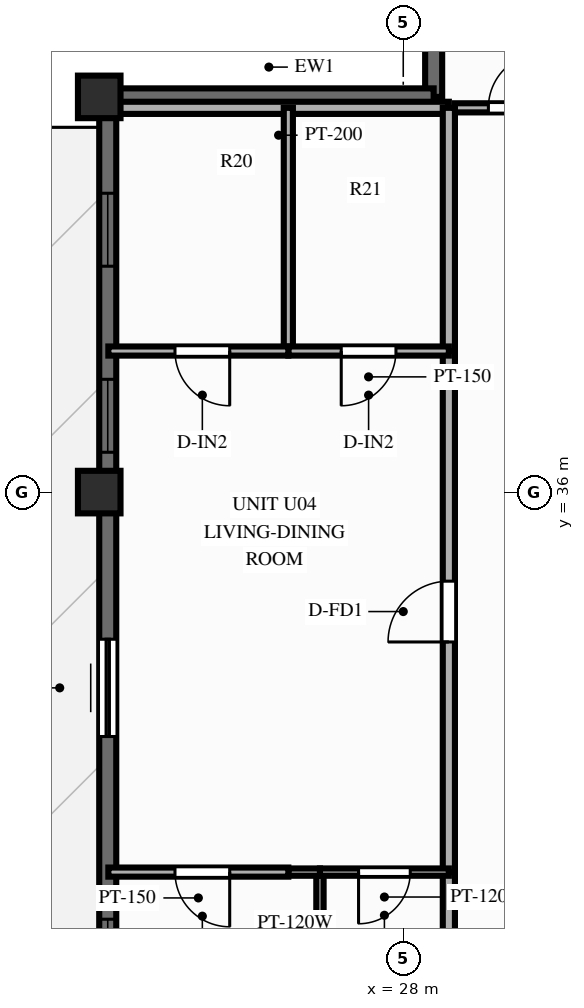
"""IFC4 building model, lengths in metres.
Left out: names, types, materials, properties, quantities, classifications, styles, units other than length and angle.
Written with IfcOpenShell. Run it as: python <this file> out.ifc"""

import sys

from ifc_helpers import new_model, si_unit, direction, frame, frame_2d, origin, origin_2d, place, context, subcontext, project, spatial, rectangle, extrude, source, transform, mapped, element, fill, save


model = new_model("IFC4")
c1 = context("Model", 3, precision=1e-05, world=origin(), true_north=direction((0.0, 1.0)))
c2 = subcontext(c1, "Body", "Model", "MODEL_VIEW")
j1 = project(units=[si_unit("LENGTHUNIT", "METRE"), si_unit("PLANEANGLEUNIT", "RADIAN")], contexts=[c1])
p1 = place(None, origin())
s1 = spatial("IfcSite", under=j1, at=p1, CompositionType="ELEMENT")
p2 = place(p1, origin())
s2 = spatial("IfcBuilding", under=s1, at=p2, CompositionType="ELEMENT")
p3 = place(p2, frame((0.0, 0.0, 243.0)))
s3 = spatial("IfcBuildingStorey", under=s2, at=p3, CompositionType="ELEMENT", Elevation=243.0)
m1 = source(origin(), c2, "Body", "SweptSolid", [
    extrude(rectangle(XDim=0.7, YDim=0.7, at=origin_2d()), origin(), (0.0, 0.0, 1.0), 3.0),
])
for number, where, z_axis, x_axis in (
    (1, (23.0, 42.5, 0.0), (0.0, 0.0, 1.0), (1.0, 0.0, 0.0)),
    (2, (23.0, 36.0, 0.0), (0.0, 0.0, 1.0), (1.0, 0.0, 0.0)),
):
    element("IfcColumn", number, at=place(p3, frame(where, z_axis=z_axis, x_axis=x_axis)), inside=s3, PredefinedType="COLUMN", context=c2, shape_type="MappedRepresentation", body=[
        mapped(m1, transform((0.0, 0.0, 0.0), scale=1.0)),
    ])
p4 = place(p3, frame((23.14, 11.5, 0.0), z_axis=(0.0, 0.0, 1.0), x_axis=(0.0, 1.0, 0.0)))
e3 = element("IfcWall", 3, at=p4, inside=s3, PredefinedType="SOLIDWALL", context=c2, shape_type="SweptSolid", body=[
    extrude(rectangle(XDim=31.0, YDim=0.28, at=frame_2d((15.5, 0.0))), origin(), (0.0, 0.0, 1.0), 2.28),
])
p5 = place(p4, frame((1.577, 0.0, 0.25)))
e4 = element("IfcOpeningElement", 4, at=p5, cuts=e3, PredefinedType="OPENING", context=c2, shape_type="SweptSolid", body=[
    extrude(rectangle(XDim=1.2, YDim=1.5, at=frame_2d((0.6, 0.75))), frame((0.0, 0.152, 0.0), z_axis=(0.0, -1.0, 0.0), x_axis=(1.0, 0.0, 0.0)), (0.0, 0.0, 1.0), 0.304),
])
p6 = place(p4, frame((4.637, 0.0, 0.25)))
e5 = element("IfcOpeningElement", 5, at=p6, cuts=e3, PredefinedType="OPENING", context=c2, shape_type="SweptSolid", body=[
    extrude(rectangle(XDim=1.2, YDim=1.5, at=frame_2d((0.6, 0.75))), frame((0.0, 0.152, 0.0), z_axis=(0.0, -1.0, 0.0), x_axis=(1.0, 0.0, 0.0)), (0.0, 0.0, 1.0), 0.304),
])
p7 = place(p4, frame((8.495, 0.0, 0.25)))
e6 = element("IfcOpeningElement", 6, at=p7, cuts=e3, PredefinedType="OPENING", context=c2, shape_type="SweptSolid", body=[
    extrude(rectangle(XDim=1.2, YDim=1.5, at=frame_2d((0.6, 0.75))), frame((0.0, 0.152, 0.0), z_axis=(0.0, -1.0, 0.0), x_axis=(1.0, 0.0, 0.0)), (0.0, 0.0, 1.0), 0.304),
])
p8 = place(p4, frame((12.9, 0.0, 0.25)))
e7 = element("IfcOpeningElement", 7, at=p8, cuts=e3, PredefinedType="OPENING", context=c2, shape_type="SweptSolid", body=[
    extrude(rectangle(XDim=1.2, YDim=1.5, at=frame_2d((0.6, 0.75))), frame((0.0, 0.152, 0.0), z_axis=(0.0, -1.0, 0.0), x_axis=(1.0, 0.0, 0.0)), (0.0, 0.0, 1.0), 0.304),
])
p9 = place(p4, frame((16.275, 0.0, 0.25)))
e8 = element("IfcOpeningElement", 8, at=p9, cuts=e3, PredefinedType="OPENING", context=c2, shape_type="SweptSolid", body=[
    extrude(rectangle(XDim=1.2, YDim=1.5, at=frame_2d((0.6, 0.75))), frame((0.0, 0.152, 0.0), z_axis=(0.0, -1.0, 0.0), x_axis=(1.0, 0.0, 0.0)), (0.0, 0.0, 1.0), 0.304),
])
p10 = place(p4, frame((20.48, 0.0, 0.0)))
e9 = element("IfcOpeningElement", 9, at=p10, cuts=e3, PredefinedType="OPENING", context=c2, shape_type="SweptSolid", body=[
    extrude(rectangle(XDim=1.6, YDim=2.15, at=frame_2d((0.8, 1.075))), frame((0.0, 0.152, 0.0), z_axis=(0.0, -1.0, 0.0), x_axis=(1.0, 0.0, 0.0)), (0.0, 0.0, 1.0), 0.304),
])
p11 = place(p4, frame((25.155, 0.0, 0.25)))
e10 = element("IfcOpeningElement", 10, at=p11, cuts=e3, PredefinedType="OPENING", context=c2, shape_type="SweptSolid", body=[
    extrude(rectangle(XDim=1.2, YDim=1.5, at=frame_2d((0.6, 0.75))), frame((0.0, 0.152, 0.0), z_axis=(0.0, -1.0, 0.0), x_axis=(1.0, 0.0, 0.0)), (0.0, 0.0, 1.0), 0.304),
])
p12 = place(p4, frame((28.215, 0.0, 0.25)))
e11 = element("IfcOpeningElement", 11, at=p12, cuts=e3, PredefinedType="OPENING", context=c2, shape_type="SweptSolid", body=[
    extrude(rectangle(XDim=1.2, YDim=1.5, at=frame_2d((0.6, 0.75))), frame((0.0, 0.152, 0.0), z_axis=(0.0, -1.0, 0.0), x_axis=(1.0, 0.0, 0.0)), (0.0, 0.0, 1.0), 0.304),
])
for number, where, z_axis, x_axis in (
    (12, (28.5, 42.5, 0.0), (0.0, 0.0, 1.0), (0.0, 1.0, 0.0)),
    (13, (23.08, 42.5, 0.0), (0.0, 0.0, 1.0), (1.0, 0.0, 0.0)),
):
    element("IfcWall", number, at=place(p3, frame(where, z_axis=z_axis, x_axis=x_axis)), inside=s3, PredefinedType="SOLIDWALL", context=c2, shape_type="SweptSolid", body=[
        extrude(rectangle(XDim=5.42, YDim=0.28, at=frame_2d((2.71, 0.0))), origin(), (0.0, 0.0, 1.0), 2.28),
    ])
p13 = place(p3, frame((28.85, 42.32, 0.0), z_axis=(0.0, 0.0, 1.0), x_axis=(1.0, 0.0, 0.0)))
e14 = element("IfcWall", 14, at=p13, inside=s3, PredefinedType="PARTITIONING", context=c2, shape_type="SweptSolid", body=[
    extrude(rectangle(XDim=2.33, YDim=0.15, at=frame_2d((1.165, 0.0))), origin(), (0.0, 0.0, 1.0), 2.79),
])
p14 = place(p13, frame((0.55, 0.0, 0.0)))
e15 = element("IfcOpeningElement", 15, at=p14, cuts=e14, PredefinedType="OPENING", context=c2, shape_type="SweptSolid", body=[
    extrude(rectangle(XDim=0.9, YDim=2.1, at=frame_2d((0.45, 1.05))), frame((0.0, 0.087, 0.0), z_axis=(0.0, -1.0, 0.0), x_axis=(1.0, 0.0, 0.0)), (0.0, 0.0, 1.0), 0.174),
])
p15 = place(p3, frame((28.75, 42.32, 0.0), z_axis=(0.0, 0.0, 1.0), x_axis=(-1.0, 0.0, 0.0)))
e16 = element("IfcWall", 16, at=p15, inside=s3, PredefinedType="PARTITIONING", context=c2, shape_type="SweptSolid", body=[
    extrude(rectangle(XDim=5.6, YDim=0.2, at=frame_2d((2.8, 0.0))), origin(), (0.0, 0.0, 1.0), 2.79),
])
p16 = place(p3, frame((28.75, 27.0, 0.0), z_axis=(0.0, 0.0, 1.0), x_axis=(0.0, 1.0, 0.0)))
e17 = element("IfcWall", 17, at=p16, inside=s3, PredefinedType="PARTITIONING", context=c2, shape_type="SweptSolid", body=[
    extrude(rectangle(XDim=2.75, YDim=0.2, at=frame_2d((1.375, 0.0))), origin(), (0.0, 0.0, 1.0), 2.79),
])
p17 = place(p3, frame((28.75, 29.75, 0.0), z_axis=(0.0, 0.0, 1.0), x_axis=(0.0, 1.0, 0.0)))
e18 = element("IfcWall", 18, at=p17, inside=s3, PredefinedType="PARTITIONING", context=c2, shape_type="SweptSolid", body=[
    extrude(rectangle(XDim=8.57, YDim=0.2, at=frame_2d((4.285, 0.0))), origin(), (0.0, 0.0, 1.0), 2.79),
])
p18 = place(p17, frame((3.785, 0.0, 0.0)))
e19 = element("IfcOpeningElement", 19, at=p18, cuts=e18, PredefinedType="OPENING", context=c2, shape_type="SweptSolid", body=[
    extrude(rectangle(XDim=1.0, YDim=2.15, at=frame_2d((0.5, 1.075))), frame((0.0, 0.112, 0.0), z_axis=(0.0, -1.0, 0.0), x_axis=(1.0, 0.0, 0.0)), (0.0, 0.0, 1.0), 0.224),
])
p19 = place(p3, frame((28.75, 38.32, 0.0), z_axis=(0.0, 0.0, 1.0), x_axis=(0.0, 1.0, 0.0)))
e20 = element("IfcWall", 20, at=p19, inside=s3, PredefinedType="PARTITIONING", context=c2, shape_type="SweptSolid", body=[
    extrude(rectangle(XDim=4.0, YDim=0.2, at=frame_2d((2.0, 0.0))), origin(), (0.0, 0.0, 1.0), 2.79),
])
p20 = place(p3, frame((26.63, 27.0, 0.0), z_axis=(0.0, 0.0, 1.0), x_axis=(0.0, 1.0, 0.0)))
e21 = element("IfcWall", 21, at=p20, inside=s3, PredefinedType="PARTITIONING", context=c2, shape_type="SweptSolid", body=[
    extrude(rectangle(XDim=2.75, YDim=0.12, at=frame_2d((1.375, 0.0))), origin(), (0.0, 0.0, 1.0), 2.39),
])
p21 = place(p3, frame((26.11, 38.32, 0.0), z_axis=(0.0, 0.0, 1.0), x_axis=(0.0, 1.0, 0.0)))
e22 = element("IfcWall", 22, at=p21, inside=s3, PredefinedType="PARTITIONING", context=c2, shape_type="SweptSolid", body=[
    extrude(rectangle(XDim=4.0, YDim=0.15, at=frame_2d((2.0, 0.0))), origin(), (0.0, 0.0, 1.0), 2.79),
])
p22 = place(p3, frame((28.75, 29.75, 0.0), z_axis=(0.0, 0.0, 1.0), x_axis=(-1.0, 0.0, 0.0)))
e23 = element("IfcWall", 23, at=p22, inside=s3, PredefinedType="PARTITIONING", context=c2, shape_type="SweptSolid", body=[
    extrude(rectangle(XDim=2.12, YDim=0.12, at=frame_2d((1.06, 0.0))), origin(), (0.0, 0.0, 1.0), 2.79),
])
p23 = place(p22, frame((0.635, 0.0, 0.0)))
e24 = element("IfcOpeningElement", 24, at=p23, cuts=e23, PredefinedType="OPENING", context=c2, shape_type="SweptSolid", body=[
    extrude(rectangle(XDim=0.85, YDim=2.05, at=frame_2d((0.425, 1.025))), frame((0.0, 0.072, 0.0), z_axis=(0.0, -1.0, 0.0), x_axis=(1.0, 0.0, 0.0)), (0.0, 0.0, 1.0), 0.144),
])
p24 = place(p3, frame((26.63, 29.75, 0.0), z_axis=(0.0, 0.0, 1.0), x_axis=(-1.0, 0.0, 0.0)))
e25 = element("IfcWall", 25, at=p24, inside=s3, PredefinedType="PARTITIONING", context=c2, shape_type="SweptSolid", body=[
    extrude(rectangle(XDim=0.52, YDim=0.12, at=frame_2d((0.26, 0.0))), origin(), (0.0, 0.0, 1.0), 2.79),
])
p25 = place(p3, frame((26.11, 29.75, 0.0), z_axis=(0.0, 0.0, 1.0), x_axis=(-1.0, 0.0, 0.0)))
e26 = element("IfcWall", 26, at=p25, inside=s3, PredefinedType="PARTITIONING", context=c2, shape_type="SweptSolid", body=[
    extrude(rectangle(XDim=2.96, YDim=0.15, at=frame_2d((1.48, 0.0))), origin(), (0.0, 0.0, 1.0), 2.79),
])
p26 = place(p25, frame((0.964, 0.0, 0.0)))
e27 = element("IfcOpeningElement", 27, at=p26, cuts=e26, PredefinedType="OPENING", context=c2, shape_type="SweptSolid", body=[
    extrude(rectangle(XDim=0.9, YDim=2.1, at=frame_2d((0.45, 1.05))), frame((0.0, 0.087, 0.0), z_axis=(0.0, -1.0, 0.0), x_axis=(1.0, 0.0, 0.0)), (0.0, 0.0, 1.0), 0.174),
])
p27 = place(p3, frame((28.75, 38.32, 0.0), z_axis=(0.0, 0.0, 1.0), x_axis=(-1.0, 0.0, 0.0)))
e28 = element("IfcWall", 28, at=p27, inside=s3, PredefinedType="PARTITIONING", context=c2, shape_type="SweptSolid", body=[
    extrude(rectangle(XDim=2.64, YDim=0.15, at=frame_2d((1.32, 0.0))), origin(), (0.0, 0.0, 1.0), 2.79),
])
p28 = place(p27, frame((0.87, 0.0, 0.0)))
e29 = element("IfcOpeningElement", 29, at=p28, cuts=e28, PredefinedType="OPENING", context=c2, shape_type="SweptSolid", body=[
    extrude(rectangle(XDim=0.9, YDim=2.1, at=frame_2d((0.45, 1.05))), frame((0.0, 0.087, 0.0), z_axis=(0.0, -1.0, 0.0), x_axis=(1.0, 0.0, 0.0)), (0.0, 0.0, 1.0), 0.174),
])
p29 = place(p3, frame((26.11, 38.32, 0.0), z_axis=(0.0, 0.0, 1.0), x_axis=(-1.0, 0.0, 0.0)))
e30 = element("IfcWall", 30, at=p29, inside=s3, PredefinedType="PARTITIONING", context=c2, shape_type="SweptSolid", body=[
    extrude(rectangle(XDim=2.96, YDim=0.15, at=frame_2d((1.48, 0.0))), origin(), (0.0, 0.0, 1.0), 2.79),
])
p30 = place(p29, frame((0.964, 0.0, 0.0)))
e31 = element("IfcOpeningElement", 31, at=p30, cuts=e30, PredefinedType="OPENING", context=c2, shape_type="SweptSolid", body=[
    extrude(rectangle(XDim=0.9, YDim=2.1, at=frame_2d((0.45, 1.05))), frame((0.0, 0.087, 0.0), z_axis=(0.0, -1.0, 0.0), x_axis=(1.0, 0.0, 0.0)), (0.0, 0.0, 1.0), 0.174),
])
m2 = source(origin(), c2, "Body", "SweptSolid", [
    extrude(rectangle(XDim=1.2, YDim=1.5, at=frame_2d((0.6, 0.75))), frame((0.0, 0.03, 0.0), z_axis=(0.0, -1.0, 0.0), x_axis=(1.0, 0.0, 0.0)), (0.0, 0.0, 1.0), 0.06),
])
p31 = place(p9, origin())
e32 = element("IfcWindow", 32, at=p31, inside=s3, PartitioningType="SINGLE_PANEL", PredefinedType="WINDOW", context=c2, shape_type="MappedRepresentation", body=[
    mapped(m2, transform((0.0, 0.0, 0.0), scale=1.0)),
])
fill(e8, e32)
m3 = source(origin(), c2, "Body", "SweptSolid", [
    extrude(rectangle(XDim=1.6, YDim=2.15, at=frame_2d((0.8, 1.075))), frame((0.0, 0.025, 0.0), z_axis=(0.0, -1.0, 0.0), x_axis=(1.0, 0.0, 0.0)), (0.0, 0.0, 1.0), 0.05),
])
p32 = place(p10, origin())
e33 = element("IfcDoor", 33, at=p32, inside=s3, OperationType="SLIDING_TO_LEFT", PredefinedType="DOOR", context=c2, shape_type="MappedRepresentation", body=[
    mapped(m3, transform((0.0, 0.0, 0.0), scale=1.0)),
])
fill(e9, e33)
p33 = place(p11, origin())
e34 = element("IfcWindow", 34, at=p33, inside=s3, PartitioningType="SINGLE_PANEL", PredefinedType="WINDOW", context=c2, shape_type="MappedRepresentation", body=[
    mapped(m2, transform((0.0, 0.0, 0.0), scale=1.0)),
])
fill(e10, e34)
p34 = place(p12, origin())
e35 = element("IfcWindow", 35, at=p34, inside=s3, PartitioningType="SINGLE_PANEL", PredefinedType="WINDOW", context=c2, shape_type="MappedRepresentation", body=[
    mapped(m2, transform((0.0, 0.0, 0.0), scale=1.0)),
])
fill(e11, e35)
m4 = source(origin(), c2, "Body", "SweptSolid", [
    extrude(rectangle(XDim=0.9, YDim=2.1, at=frame_2d((0.45, 1.05))), frame((0.0, 0.025, 0.0), z_axis=(0.0, -1.0, 0.0), x_axis=(1.0, 0.0, 0.0)), (0.0, 0.0, 1.0), 0.05),
])
p35 = place(p14, origin())
e36 = element("IfcDoor", 36, at=p35, inside=s3, OperationType="SINGLE_SWING_RIGHT", PredefinedType="DOOR", context=c2, shape_type="MappedRepresentation", body=[
    mapped(m4, transform((0.0, 0.0, 0.0), scale=1.0)),
])
fill(e15, e36)
m5 = source(origin(), c2, "Body", "SweptSolid", [
    extrude(rectangle(XDim=1.0, YDim=2.15, at=frame_2d((0.5, 1.075))), frame((0.0, 0.025, 0.0), z_axis=(0.0, -1.0, 0.0), x_axis=(1.0, 0.0, 0.0)), (0.0, 0.0, 1.0), 0.05),
])
p36 = place(p18, origin())
e37 = element("IfcDoor", 37, at=p36, inside=s3, OperationType="SINGLE_SWING_LEFT", PredefinedType="DOOR", context=c2, shape_type="MappedRepresentation", body=[
    mapped(m5, transform((0.0, 0.0, 0.0), scale=1.0)),
])
fill(e19, e37)
m6 = source(origin(), c2, "Body", "SweptSolid", [
    extrude(rectangle(XDim=0.85, YDim=2.05, at=frame_2d((0.425, 1.025))), frame((0.0, 0.025, 0.0), z_axis=(0.0, -1.0, 0.0), x_axis=(1.0, 0.0, 0.0)), (0.0, 0.0, 1.0), 0.05),
])
p37 = place(p23, origin())
e38 = element("IfcDoor", 38, at=p37, inside=s3, OperationType="SINGLE_SWING_RIGHT", PredefinedType="DOOR", context=c2, shape_type="MappedRepresentation", body=[
    mapped(m6, transform((0.0, 0.0, 0.0), scale=1.0)),
])
fill(e24, e38)
p38 = place(p26, origin())
e39 = element("IfcDoor", 39, at=p38, inside=s3, OperationType="SINGLE_SWING_LEFT", PredefinedType="DOOR", context=c2, shape_type="MappedRepresentation", body=[
    mapped(m4, transform((0.0, 0.0, 0.0), scale=1.0)),
])
fill(e27, e39)
p39 = place(p28, origin())
e40 = element("IfcDoor", 40, at=p39, inside=s3, OperationType="SINGLE_SWING_RIGHT", PredefinedType="DOOR", context=c2, shape_type="MappedRepresentation", body=[
    mapped(m4, transform((0.0, 0.0, 0.0), scale=1.0)),
])
fill(e29, e40)
p40 = place(p30, origin())
e41 = element("IfcDoor", 41, at=p40, inside=s3, OperationType="SINGLE_SWING_LEFT", PredefinedType="DOOR", context=c2, shape_type="MappedRepresentation", body=[
    mapped(m4, transform((0.0, 0.0, 0.0), scale=1.0)),
])
fill(e31, e41)
save(model, sys.argv[1])
